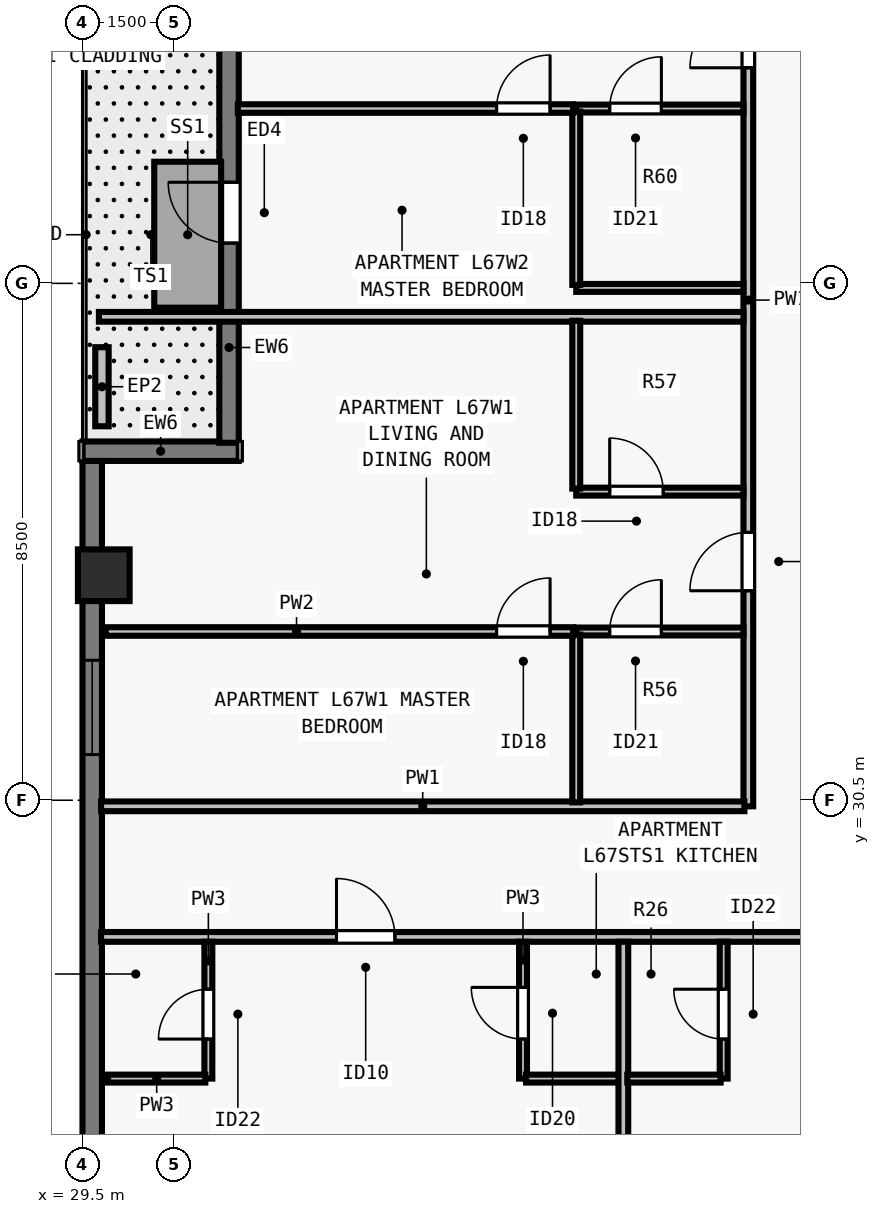
"""IFC4 building model, lengths in metres.
Left out: names, types, materials, properties, quantities, classifications, styles, units other than length and angle.
Written with IfcOpenShell. Run it as: python <this file> out.ifc"""

import sys

from ifc_helpers import new_model, si_unit, direction, frame, frame_2d, origin, origin_2d, place, context, subcontext, project, spatial, rectangle, extrude, element, fill, save


model = new_model("IFC4")
c1 = context("Model", 3, precision=1e-05, world=origin(), true_north=direction((0.0, 1.0)))
c2 = subcontext(c1, "Body", "Model", "MODEL_VIEW")
j1 = project(units=[si_unit("LENGTHUNIT", "METRE"), si_unit("PLANEANGLEUNIT", "RADIAN")], contexts=[c1])
p1 = place(None, origin())
s1 = spatial("IfcSite", under=j1, at=p1, CompositionType="ELEMENT")
p2 = place(p1, origin())
s2 = spatial("IfcBuilding", under=s1, at=p2, CompositionType="ELEMENT")
p3 = place(p2, frame((0.0, 0.0, 244.5)))
s3 = spatial("IfcBuildingStorey", under=s2, at=p3, CompositionType="ELEMENT", Elevation=244.5)
p4 = place(p3, frame((29.85, 34.2, 0.0), z_axis=(0.0, 0.0, 1.0), x_axis=(0.0, 1.0, 0.0)))
e1 = element("IfcColumn", 1, at=p4, inside=s3, PredefinedType="COLUMN", context=c2, shape_type="SweptSolid", body=[
    extrude(rectangle(XDim=0.85, YDim=0.85, at=origin_2d()), origin(), (0.0, 0.0, 1.0), 3.5),
])
p5 = place(p3, frame((29.66, 21.5, 0.0), z_axis=(0.0, 0.0, 1.0), x_axis=(0.0, 1.0, 0.0)))
e2 = element("IfcWall", 2, at=p5, inside=s3, PredefinedType="SOLIDWALL", context=c2, shape_type="SweptSolid", body=[
    extrude(rectangle(XDim=14.602, YDim=0.32, at=frame_2d((7.301, 0.0))), origin(), (0.0, 0.0, 1.0), 3.29),
])
p6 = place(p5, frame((9.751, 0.0, 0.8)))
e3 = element("IfcOpeningElement", 3, at=p6, cuts=e2, PredefinedType="OPENING", context=c2, shape_type="SweptSolid", body=[
    extrude(rectangle(XDim=1.55, YDim=1.678, at=frame_2d((0.775, 0.839))), frame((0.0, 0.17, 0.0), z_axis=(0.0, -1.0, 0.0), x_axis=(1.0, 0.0, 0.0)), (0.0, 0.0, 1.0), 0.34),
])
p7 = place(p3, frame((29.5, 36.24, 0.0), z_axis=(0.0, 0.0, 1.0), x_axis=(1.0, 0.0, 0.0)))
e4 = element("IfcWall", 4, at=p7, inside=s3, PredefinedType="SOLIDWALL", context=c2, shape_type="SweptSolid", body=[
    extrude(rectangle(XDim=2.57, YDim=0.32, at=frame_2d((1.285, 0.0))), origin(), (0.0, 0.0, 1.0), 3.29),
])
p8 = place(p3, frame((31.91, 36.378, 0.0), z_axis=(0.0, 0.0, 1.0), x_axis=(0.0, 1.0, 0.0)))
e5 = element("IfcWall", 5, at=p8, inside=s3, PredefinedType="SOLIDWALL", context=c2, shape_type="SweptSolid", body=[
    extrude(rectangle(XDim=7.142, YDim=0.32, at=frame_2d((3.571, 0.0))), origin(), (0.0, 0.0, 1.0), 3.29),
])
p9 = place(p8, frame((3.284, 0.0, 0.0)))
e6 = element("IfcOpeningElement", 6, at=p9, cuts=e5, PredefinedType="OPENING", context=c2, shape_type="SweptSolid", body=[
    extrude(rectangle(XDim=1.0, YDim=2.15, at=frame_2d((0.5, 1.075))), frame((0.0, 0.17, 0.0), z_axis=(0.0, -1.0, 0.0), x_axis=(1.0, 0.0, 0.0)), (0.0, 0.0, 1.0), 0.34),
])
p10 = place(p3, frame((29.82, 36.65, 0.0), z_axis=(0.0, 0.0, 1.0), x_axis=(0.0, 1.0, 0.0)))
e7 = element("IfcWall", 7, at=p10, inside=s3, PredefinedType="PARAPET", context=c2, shape_type="SweptSolid", body=[
    extrude(rectangle(XDim=1.3, YDim=0.22, at=frame_2d((0.65, 0.0))), origin(), (0.0, 0.0, 1.0), 0.55),
])
p11 = place(p3, frame((29.805, 28.252, 0.0), z_axis=(0.0, 0.0, 1.0), x_axis=(1.0, 0.0, 0.0)))
e8 = element("IfcWall", 8, at=p11, inside=s3, PredefinedType="PARTITIONING", context=c2, shape_type="SweptSolid", body=[
    extrude(rectangle(XDim=44.39, YDim=0.16, at=frame_2d((22.195, 0.0))), origin(), (0.0, 0.0, 1.0), 2.958),
])
p12 = place(p11, frame((3.872, 0.0, 0.0)))
e9 = element("IfcOpeningElement", 9, at=p12, cuts=e8, PredefinedType="OPENING", context=c2, shape_type="SweptSolid", body=[
    extrude(rectangle(XDim=0.96, YDim=2.18, at=frame_2d((0.48, 1.09))), frame((0.0, 0.09, 0.0), z_axis=(0.0, -1.0, 0.0), x_axis=(1.0, 0.0, 0.0)), (0.0, 0.0, 1.0), 0.18),
])
p13 = place(p11, frame((12.828, 0.0, 0.0)))
e10 = element("IfcOpeningElement", 10, at=p13, cuts=e8, PredefinedType="OPENING", context=c2, shape_type="SweptSolid", body=[
    extrude(rectangle(XDim=0.96, YDim=2.18, at=frame_2d((0.48, 1.09))), frame((0.0, 0.09, 0.0), z_axis=(0.0, -1.0, 0.0), x_axis=(1.0, 0.0, 0.0)), (0.0, 0.0, 1.0), 0.18),
])
p14 = place(p11, frame((21.66, 0.0, 0.0)))
e11 = element("IfcOpeningElement", 11, at=p14, cuts=e8, PredefinedType="OPENING", context=c2, shape_type="SweptSolid", body=[
    extrude(rectangle(XDim=0.96, YDim=2.18, at=frame_2d((0.48, 1.09))), frame((0.0, 0.09, 0.0), z_axis=(0.0, -1.0, 0.0), x_axis=(1.0, 0.0, 0.0)), (0.0, 0.0, 1.0), 0.18),
])
p15 = place(p11, frame((30.492, 0.0, 0.0)))
e12 = element("IfcOpeningElement", 12, at=p15, cuts=e8, PredefinedType="OPENING", context=c2, shape_type="SweptSolid", body=[
    extrude(rectangle(XDim=0.96, YDim=2.18, at=frame_2d((0.48, 1.09))), frame((0.0, 0.09, 0.0), z_axis=(0.0, -1.0, 0.0), x_axis=(1.0, 0.0, 0.0)), (0.0, 0.0, 1.0), 0.18),
])
p16 = place(p11, frame((39.503, 0.0, 0.0)))
e13 = element("IfcOpeningElement", 13, at=p16, cuts=e8, PredefinedType="OPENING", context=c2, shape_type="SweptSolid", body=[
    extrude(rectangle(XDim=0.96, YDim=2.18, at=frame_2d((0.48, 1.09))), frame((0.0, 0.09, 0.0), z_axis=(0.0, -1.0, 0.0), x_axis=(1.0, 0.0, 0.0)), (0.0, 0.0, 1.0), 0.18),
])
p17 = place(p3, frame((40.45, 30.4, 0.0), z_axis=(0.0, 0.0, 1.0), x_axis=(0.0, 1.0, 0.0)))
e14 = element("IfcWall", 14, at=p17, inside=s3, PredefinedType="PARTITIONING", context=c2, shape_type="SweptSolid", body=[
    extrude(rectangle(XDim=17.2, YDim=0.16, at=frame_2d((8.6, 0.0))), origin(), (0.0, 0.0, 1.0), 3.29),
])
p18 = place(p17, frame((3.545, 0.0, 0.0)))
e15 = element("IfcOpeningElement", 15, at=p18, cuts=e14, PredefinedType="OPENING", context=c2, shape_type="SweptSolid", body=[
    extrude(rectangle(XDim=0.96, YDim=2.18, at=frame_2d((0.48, 1.09))), frame((0.0, 0.09, 0.0), z_axis=(0.0, -1.0, 0.0), x_axis=(1.0, 0.0, 0.0)), (0.0, 0.0, 1.0), 0.18),
])
p19 = place(p17, frame((12.145, 0.0, 0.0)))
e16 = element("IfcOpeningElement", 16, at=p19, cuts=e14, PredefinedType="OPENING", context=c2, shape_type="SweptSolid", body=[
    extrude(rectangle(XDim=0.96, YDim=2.18, at=frame_2d((0.48, 1.09))), frame((0.0, 0.09, 0.0), z_axis=(0.0, -1.0, 0.0), x_axis=(1.0, 0.0, 0.0)), (0.0, 0.0, 1.0), 0.18),
])
p20 = place(p3, frame((29.805, 30.4, 0.0), z_axis=(0.0, 0.0, 1.0), x_axis=(1.0, 0.0, 0.0)))
e17 = element("IfcWall", 17, at=p20, inside=s3, PredefinedType="PARTITIONING", context=c2, shape_type="SweptSolid", body=[
    extrude(rectangle(XDim=10.58, YDim=0.16, at=frame_2d((5.29, 0.0))), origin(), (0.0, 0.0, 1.0), 3.29),
])
p21 = place(p3, frame((31.57, 25.923, 0.0), z_axis=(0.0, 0.0, 1.0), x_axis=(0.0, 1.0, 0.0)))
e18 = element("IfcWall", 18, at=p21, inside=s3, PredefinedType="PLUMBINGWALL", context=c2, shape_type="SweptSolid", body=[
    extrude(rectangle(XDim=2.25, YDim=0.13, at=frame_2d((1.125, 0.0))), origin(), (0.0, 0.0, 1.0), 3.29),
])
p22 = place(p21, frame((0.65, 0.0, 0.0)))
e19 = element("IfcOpeningElement", 19, at=p22, cuts=e18, PredefinedType="OPENING", context=c2, shape_type="SweptSolid", body=[
    extrude(rectangle(XDim=0.82, YDim=2.1, at=frame_2d((0.41, 1.05))), frame((0.0, 0.075, 0.0), z_axis=(0.0, -1.0, 0.0), x_axis=(1.0, 0.0, 0.0)), (0.0, 0.0, 1.0), 0.15),
])
p23 = place(p3, frame((29.92, 25.923, 0.0), z_axis=(0.0, 0.0, 1.0), x_axis=(1.0, 0.0, 0.0)))
e20 = element("IfcWall", 20, at=p23, inside=s3, PredefinedType="PLUMBINGWALL", context=c2, shape_type="SweptSolid", body=[
    extrude(rectangle(XDim=1.6, YDim=0.13, at=frame_2d((0.8, 0.0))), origin(), (0.0, 0.0, 1.0), 3.29),
])
p24 = place(p3, frame((36.744, 25.923, 0.0), z_axis=(0.0, 0.0, 1.0), x_axis=(0.0, 1.0, 0.0)))
e21 = element("IfcWall", 21, at=p24, inside=s3, PredefinedType="PLUMBINGWALL", context=c2, shape_type="SweptSolid", body=[
    extrude(rectangle(XDim=2.25, YDim=0.13, at=frame_2d((1.125, 0.0))), origin(), (0.0, 0.0, 1.0), 3.29),
])
p25 = place(p24, frame((0.65, 0.0, 0.0)))
e22 = element("IfcOpeningElement", 22, at=p25, cuts=e21, PredefinedType="OPENING", context=c2, shape_type="SweptSolid", body=[
    extrude(rectangle(XDim=0.85, YDim=2.1, at=frame_2d((0.425, 1.05))), frame((0.0, 0.075, 0.0), z_axis=(0.0, -1.0, 0.0), x_axis=(1.0, 0.0, 0.0)), (0.0, 0.0, 1.0), 0.15),
])
p26 = place(p3, frame((36.794, 25.923, 0.0), z_axis=(0.0, 0.0, 1.0), x_axis=(1.0, 0.0, 0.0)))
e23 = element("IfcWall", 23, at=p26, inside=s3, PredefinedType="PLUMBINGWALL", context=c2, shape_type="SweptSolid", body=[
    extrude(rectangle(XDim=1.6, YDim=0.13, at=frame_2d((0.8, 0.0))), origin(), (0.0, 0.0, 1.0), 3.29),
])
p27 = place(p3, frame((38.395, 16.805, 0.0), z_axis=(0.0, 0.0, 1.0), x_axis=(0.0, 1.0, 0.0)))
e24 = element("IfcWall", 24, at=p27, inside=s3, PredefinedType="PARTITIONING", context=c2, shape_type="SweptSolid", body=[
    extrude(rectangle(XDim=11.368, YDim=0.16, at=frame_2d((5.684, 0.0))), origin(), (0.0, 0.0, 1.0), 2.573),
])
p28 = place(p3, frame((40.044, 25.923, 0.0), z_axis=(0.0, 0.0, 1.0), x_axis=(0.0, 1.0, 0.0)))
e25 = element("IfcWall", 25, at=p28, inside=s3, PredefinedType="PLUMBINGWALL", context=c2, shape_type="SweptSolid", body=[
    extrude(rectangle(XDim=2.25, YDim=0.13, at=frame_2d((1.125, 0.0))), origin(), (0.0, 0.0, 1.0), 3.29),
])
p29 = place(p28, frame((0.65, 0.0, 0.0)))
e26 = element("IfcOpeningElement", 26, at=p29, cuts=e25, PredefinedType="OPENING", context=c2, shape_type="SweptSolid", body=[
    extrude(rectangle(XDim=0.82, YDim=2.1, at=frame_2d((0.41, 1.05))), frame((0.0, 0.075, 0.0), z_axis=(0.0, -1.0, 0.0), x_axis=(1.0, 0.0, 0.0)), (0.0, 0.0, 1.0), 0.15),
])
p30 = place(p3, frame((38.459, 25.923, 0.0), z_axis=(0.0, 0.0, 1.0), x_axis=(1.0, 0.0, 0.0)))
e27 = element("IfcWall", 27, at=p30, inside=s3, PredefinedType="PLUMBINGWALL", context=c2, shape_type="SweptSolid", body=[
    extrude(rectangle(XDim=1.535, YDim=0.13, at=frame_2d((0.768, 0.0))), origin(), (0.0, 0.0, 1.0), 3.29),
])
p31 = place(p3, frame((29.77, 38.45, 0.0), z_axis=(0.0, 0.0, 1.0), x_axis=(1.0, 0.0, 0.0)))
e28 = element("IfcWall", 28, at=p31, inside=s3, PredefinedType="PARTITIONING", context=c2, shape_type="SweptSolid", body=[
    extrude(rectangle(XDim=10.6, YDim=0.16, at=frame_2d((5.3, 0.0))), origin(), (0.0, 0.0, 1.0), 2.958),
])
p32 = place(p3, frame((37.62, 33.275, 0.0), z_axis=(0.0, 0.0, 1.0), x_axis=(1.0, 0.0, 0.0)))
e29 = element("IfcWall", 29, at=p32, inside=s3, PredefinedType="PLUMBINGWALL", context=c2, shape_type="SweptSolid", body=[
    extrude(rectangle(XDim=2.75, YDim=0.13, at=frame_2d((1.375, 0.0))), origin(), (0.0, 0.0, 1.0), 3.29),
])
p33 = place(p32, frame((0.55, 0.0, 0.0)))
e30 = element("IfcOpeningElement", 30, at=p33, cuts=e29, PredefinedType="OPENING", context=c2, shape_type="SweptSolid", body=[
    extrude(rectangle(XDim=0.85, YDim=2.08, at=frame_2d((0.425, 1.04))), frame((0.0, 0.075, 0.0), z_axis=(0.0, -1.0, 0.0), x_axis=(1.0, 0.0, 0.0)), (0.0, 0.0, 1.0), 0.15),
])
p34 = place(p3, frame((37.62, 30.465, 0.0), z_axis=(0.0, 0.0, 1.0), x_axis=(0.0, 1.0, 0.0)))
e31 = element("IfcWall", 31, at=p34, inside=s3, PredefinedType="PLUMBINGWALL", context=c2, shape_type="SweptSolid", body=[
    extrude(rectangle(XDim=2.76, YDim=0.13, at=frame_2d((1.38, 0.0))), origin(), (0.0, 0.0, 1.0), 3.29),
])
p35 = place(p3, frame((37.62, 35.575, 0.0), z_axis=(0.0, 0.0, 1.0), x_axis=(1.0, 0.0, 0.0)))
e32 = element("IfcWall", 32, at=p35, inside=s3, PredefinedType="PLUMBINGWALL", context=c2, shape_type="SweptSolid", body=[
    extrude(rectangle(XDim=2.75, YDim=0.13, at=frame_2d((1.375, 0.0))), origin(), (0.0, 0.0, 1.0), 3.29),
])
p36 = place(p35, frame((0.55, 0.0, 0.0)))
e33 = element("IfcOpeningElement", 33, at=p36, cuts=e32, PredefinedType="OPENING", context=c2, shape_type="SweptSolid", body=[
    extrude(rectangle(XDim=0.88, YDim=2.1, at=frame_2d((0.44, 1.05))), frame((0.0, 0.075, 0.0), z_axis=(0.0, -1.0, 0.0), x_axis=(1.0, 0.0, 0.0)), (0.0, 0.0, 1.0), 0.15),
])
p37 = place(p3, frame((37.62, 35.625, 0.0), z_axis=(0.0, 0.0, 1.0), x_axis=(0.0, 1.0, 0.0)))
e34 = element("IfcWall", 34, at=p37, inside=s3, PredefinedType="PLUMBINGWALL", context=c2, shape_type="SweptSolid", body=[
    extrude(rectangle(XDim=2.76, YDim=0.13, at=frame_2d((1.38, 0.0))), origin(), (0.0, 0.0, 1.0), 3.29),
])
p38 = place(p3, frame((29.88, 33.275, 0.0), z_axis=(0.0, 0.0, 1.0), x_axis=(1.0, 0.0, 0.0)))
e35 = element("IfcWall", 35, at=p38, inside=s3, PredefinedType="PARTITIONING", context=c2, shape_type="SweptSolid", body=[
    extrude(rectangle(XDim=7.69, YDim=0.14, at=frame_2d((3.845, 0.0))), origin(), (0.0, 0.0, 1.0), 2.573),
])
p39 = place(p38, frame((6.43, 0.0, 0.0)))
e36 = element("IfcOpeningElement", 36, at=p39, cuts=e35, PredefinedType="OPENING", context=c2, shape_type="SweptSolid", body=[
    extrude(rectangle(XDim=0.88, YDim=2.1, at=frame_2d((0.44, 1.05))), frame((0.0, 0.08, 0.0), z_axis=(0.0, -1.0, 0.0), x_axis=(1.0, 0.0, 0.0)), (0.0, 0.0, 1.0), 0.16),
])
p40 = place(p3, frame((37.62, 38.925, 0.0), z_axis=(0.0, 0.0, 1.0), x_axis=(1.0, 0.0, 0.0)))
e37 = element("IfcWall", 37, at=p40, inside=s3, PredefinedType="PLUMBINGWALL", context=c2, shape_type="SweptSolid", body=[
    extrude(rectangle(XDim=2.75, YDim=0.13, at=frame_2d((1.375, 0.0))), origin(), (0.0, 0.0, 1.0), 3.29),
])
p41 = place(p3, frame((37.62, 41.875, 0.0), z_axis=(0.0, 0.0, 1.0), x_axis=(1.0, 0.0, 0.0)))
e38 = element("IfcWall", 38, at=p41, inside=s3, PredefinedType="PLUMBINGWALL", context=c2, shape_type="SweptSolid", body=[
    extrude(rectangle(XDim=2.75, YDim=0.13, at=frame_2d((1.375, 0.0))), origin(), (0.0, 0.0, 1.0), 2.958),
])
p42 = place(p41, frame((0.55, 0.0, 0.0)))
e39 = element("IfcOpeningElement", 39, at=p42, cuts=e38, PredefinedType="OPENING", context=c2, shape_type="SweptSolid", body=[
    extrude(rectangle(XDim=0.85, YDim=2.08, at=frame_2d((0.425, 1.04))), frame((0.0, 0.075, 0.0), z_axis=(0.0, -1.0, 0.0), x_axis=(1.0, 0.0, 0.0)), (0.0, 0.0, 1.0), 0.15),
])
p43 = place(p3, frame((37.62, 38.975, 0.0), z_axis=(0.0, 0.0, 1.0), x_axis=(0.0, 1.0, 0.0)))
e40 = element("IfcWall", 40, at=p43, inside=s3, PredefinedType="PLUMBINGWALL", context=c2, shape_type="SweptSolid", body=[
    extrude(rectangle(XDim=2.85, YDim=0.13, at=frame_2d((1.425, 0.0))), origin(), (0.0, 0.0, 1.0), 3.29),
])
p44 = place(p3, frame((32.055, 41.875, 0.0), z_axis=(0.0, 0.0, 1.0), x_axis=(1.0, 0.0, 0.0)))
e41 = element("IfcWall", 41, at=p44, inside=s3, PredefinedType="PARTITIONING", context=c2, shape_type="SweptSolid", body=[
    extrude(rectangle(XDim=5.515, YDim=0.14, at=frame_2d((2.758, 0.0))), origin(), (0.0, 0.0, 1.0), 3.29),
])
p45 = place(p44, frame((4.255, 0.0, 0.0)))
e42 = element("IfcOpeningElement", 42, at=p45, cuts=e41, PredefinedType="OPENING", context=c2, shape_type="SweptSolid", body=[
    extrude(rectangle(XDim=0.88, YDim=2.1, at=frame_2d((0.44, 1.05))), frame((0.0, 0.08, 0.0), z_axis=(0.0, -1.0, 0.0), x_axis=(1.0, 0.0, 0.0)), (0.0, 0.0, 1.0), 0.16),
])
p46 = place(p6, origin())
e43 = element("IfcWindow", 43, at=p46, inside=s3, PartitioningType="SINGLE_PANEL", PredefinedType="WINDOW", context=c2, shape_type="SweptSolid", body=[
    extrude(rectangle(XDim=1.55, YDim=1.678, at=frame_2d((0.775, 0.839))), frame((0.0, -0.05, 0.0), z_axis=(0.0, -1.0, 0.0), x_axis=(1.0, 0.0, 0.0)), (0.0, 0.0, 1.0), 0.06),
])
fill(e3, e43)
p47 = place(p9, origin())
e44 = element("IfcDoor", 44, at=p47, inside=s3, OperationType="SINGLE_SWING_RIGHT", PredefinedType="DOOR", context=c2, shape_type="SweptSolid", body=[
    extrude(rectangle(XDim=1.0, YDim=2.15, at=frame_2d((0.5, 1.075))), frame((0.0, 0.025, 0.0), z_axis=(0.0, -1.0, 0.0), x_axis=(1.0, 0.0, 0.0)), (0.0, 0.0, 1.0), 0.05),
])
fill(e6, e44)
p48 = place(p22, origin())
e45 = element("IfcDoor", 45, at=p48, inside=s3, OperationType="SINGLE_SWING_LEFT", PredefinedType="DOOR", context=c2, shape_type="SweptSolid", body=[
    extrude(rectangle(XDim=0.82, YDim=2.1, at=frame_2d((0.41, 1.05))), frame((0.0, 0.025, 0.0), z_axis=(0.0, -1.0, 0.0), x_axis=(1.0, 0.0, 0.0)), (0.0, 0.0, 1.0), 0.05),
])
fill(e19, e45)
p49 = place(p25, origin())
e46 = element("IfcDoor", 46, at=p49, inside=s3, OperationType="SINGLE_SWING_RIGHT", PredefinedType="DOOR", context=c2, shape_type="SweptSolid", body=[
    extrude(rectangle(XDim=0.85, YDim=2.1, at=frame_2d((0.425, 1.05))), frame((0.0, 0.025, 0.0), z_axis=(0.0, -1.0, 0.0), x_axis=(1.0, 0.0, 0.0)), (0.0, 0.0, 1.0), 0.05),
])
fill(e22, e46)
p50 = place(p12, origin())
e47 = element("IfcDoor", 47, at=p50, inside=s3, OperationType="SINGLE_SWING_LEFT", PredefinedType="DOOR", context=c2, shape_type="SweptSolid", body=[
    extrude(rectangle(XDim=0.96, YDim=2.18, at=frame_2d((0.48, 1.09))), frame((0.0, 0.025, 0.0), z_axis=(0.0, -1.0, 0.0), x_axis=(1.0, 0.0, 0.0)), (0.0, 0.0, 1.0), 0.05),
])
fill(e9, e47)
p51 = place(p29, origin())
e48 = element("IfcDoor", 48, at=p51, inside=s3, OperationType="SINGLE_SWING_RIGHT", PredefinedType="DOOR", context=c2, shape_type="SweptSolid", body=[
    extrude(rectangle(XDim=0.82, YDim=2.1, at=frame_2d((0.41, 1.05))), frame((0.0, 0.025, 0.0), z_axis=(0.0, -1.0, 0.0), x_axis=(1.0, 0.0, 0.0)), (0.0, 0.0, 1.0), 0.05),
])
fill(e26, e48)
p52 = place(p33, origin())
e49 = element("IfcDoor", 49, at=p52, inside=s3, OperationType="SINGLE_SWING_RIGHT", PredefinedType="DOOR", context=c2, shape_type="SweptSolid", body=[
    extrude(rectangle(XDim=0.85, YDim=2.08, at=frame_2d((0.425, 1.04))), frame((0.0, 0.025, 0.0), z_axis=(0.0, -1.0, 0.0), x_axis=(1.0, 0.0, 0.0)), (0.0, 0.0, 1.0), 0.05),
])
fill(e30, e49)
p53 = place(p36, origin())
e50 = element("IfcDoor", 50, at=p53, inside=s3, OperationType="SINGLE_SWING_LEFT", PredefinedType="DOOR", context=c2, shape_type="SweptSolid", body=[
    extrude(rectangle(XDim=0.88, YDim=2.1, at=frame_2d((0.44, 1.05))), frame((0.0, 0.025, 0.0), z_axis=(0.0, -1.0, 0.0), x_axis=(1.0, 0.0, 0.0)), (0.0, 0.0, 1.0), 0.05),
])
fill(e33, e50)
p54 = place(p39, origin())
e51 = element("IfcDoor", 51, at=p54, inside=s3, OperationType="SINGLE_SWING_RIGHT", PredefinedType="DOOR", context=c2, shape_type="SweptSolid", body=[
    extrude(rectangle(XDim=0.88, YDim=2.1, at=frame_2d((0.44, 1.05))), frame((0.0, 0.025, 0.0), z_axis=(0.0, -1.0, 0.0), x_axis=(1.0, 0.0, 0.0)), (0.0, 0.0, 1.0), 0.05),
])
fill(e36, e51)
p55 = place(p18, origin())
e52 = element("IfcDoor", 52, at=p55, inside=s3, OperationType="SINGLE_SWING_LEFT", PredefinedType="DOOR", context=c2, shape_type="SweptSolid", body=[
    extrude(rectangle(XDim=0.96, YDim=2.18, at=frame_2d((0.48, 1.09))), frame((0.0, 0.025, 0.0), z_axis=(0.0, -1.0, 0.0), x_axis=(1.0, 0.0, 0.0)), (0.0, 0.0, 1.0), 0.05),
])
fill(e15, e52)
p56 = place(p42, origin())
e53 = element("IfcDoor", 53, at=p56, inside=s3, OperationType="SINGLE_SWING_RIGHT", PredefinedType="DOOR", context=c2, shape_type="SweptSolid", body=[
    extrude(rectangle(XDim=0.85, YDim=2.08, at=frame_2d((0.425, 1.04))), frame((0.0, 0.025, 0.0), z_axis=(0.0, -1.0, 0.0), x_axis=(1.0, 0.0, 0.0)), (0.0, 0.0, 1.0), 0.05),
])
fill(e39, e53)
p57 = place(p45, origin())
e54 = element("IfcDoor", 54, at=p57, inside=s3, OperationType="SINGLE_SWING_RIGHT", PredefinedType="DOOR", context=c2, shape_type="SweptSolid", body=[
    extrude(rectangle(XDim=0.88, YDim=2.1, at=frame_2d((0.44, 1.05))), frame((0.0, 0.025, 0.0), z_axis=(0.0, -1.0, 0.0), x_axis=(1.0, 0.0, 0.0)), (0.0, 0.0, 1.0), 0.05),
])
fill(e42, e54)
p58 = place(p19, origin())
e55 = element("IfcDoor", 55, at=p58, inside=s3, OperationType="SINGLE_SWING_LEFT", PredefinedType="DOOR", context=c2, shape_type="SweptSolid", body=[
    extrude(rectangle(XDim=0.96, YDim=2.18, at=frame_2d((0.48, 1.09))), frame((0.0, 0.025, 0.0), z_axis=(0.0, -1.0, 0.0), x_axis=(1.0, 0.0, 0.0)), (0.0, 0.0, 1.0), 0.05),
])
fill(e16, e55)
save(model, sys.argv[1])
